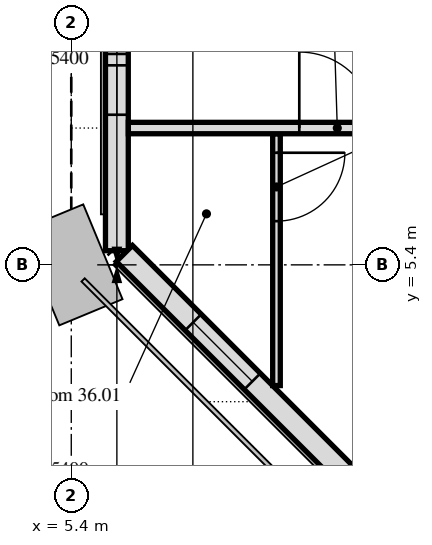
"""IFC4 building model, lengths in metres.
Left out: names, types, materials, properties, quantities, classifications, styles, units other than length and angle.
Written with IfcOpenShell. Run it as: python <this file> out.ifc"""

import sys

from ifc_helpers import new_model, si_unit, direction, frame, frame_2d, origin, place, context, subcontext, project, spatial, rectangle, extrude, element, fill, save


model = new_model("IFC4")
c1 = context("Model", 3, precision=1e-05, world=origin(), true_north=direction((0.0, 1.0)))
c2 = subcontext(c1, "Body", "Model", "MODEL_VIEW")
j1 = project(units=[si_unit("LENGTHUNIT", "METRE"), si_unit("PLANEANGLEUNIT", "RADIAN")], contexts=[c1])
p1 = place(None, origin())
s1 = spatial("IfcSite", under=j1, at=p1, CompositionType="ELEMENT")
p2 = place(p1, origin())
s2 = spatial("IfcBuilding", under=s1, at=p2, CompositionType="ELEMENT")
p3 = place(p2, frame((0.0, 0.0, 156.1)))
s3 = spatial("IfcBuildingStorey", under=s2, at=p3, CompositionType="ELEMENT", Elevation=156.1)
p4 = place(p3, frame((6.0, 16.2, 0.0), z_axis=(0.0, 0.0, 1.0), x_axis=(0.0, -1.0, 0.0)))
e1 = element("IfcWall", 1, at=p4, inside=s3, PredefinedType="SOLIDWALL", context=c2, shape_type="SweptSolid", body=[
    extrude(rectangle(XDim=10.614, YDim=0.3, at=frame_2d((5.307, 0.0))), origin(), (0.0, 0.0, 1.0), 3.0),
])
p5 = place(p4, frame((1.35, 0.0, 0.9)))
e2 = element("IfcOpeningElement", 2, at=p5, cuts=e1, PredefinedType="OPENING", context=c2, shape_type="SweptSolid", body=[
    extrude(rectangle(XDim=1.1, YDim=1.7, at=frame_2d((0.55, 0.85))), frame((0.0, 0.16, 0.0), z_axis=(0.0, -1.0, 0.0), x_axis=(1.0, 0.0, 0.0)), (0.0, 0.0, 1.0), 0.32),
])
p6 = place(p4, frame((2.95, 0.0, 0.9)))
e3 = element("IfcOpeningElement", 3, at=p6, cuts=e1, PredefinedType="OPENING", context=c2, shape_type="SweptSolid", body=[
    extrude(rectangle(XDim=1.1, YDim=1.7, at=frame_2d((0.55, 0.85))), frame((0.0, 0.16, 0.0), z_axis=(0.0, -1.0, 0.0), x_axis=(1.0, 0.0, 0.0)), (0.0, 0.0, 1.0), 0.32),
])
p7 = place(p4, frame((7.375, 0.0, 0.9)))
e4 = element("IfcOpeningElement", 4, at=p7, cuts=e1, PredefinedType="OPENING", context=c2, shape_type="SweptSolid", body=[
    extrude(rectangle(XDim=0.65, YDim=1.7, at=frame_2d((0.325, 0.85))), frame((0.0, 0.16, 0.0), z_axis=(0.0, -1.0, 0.0), x_axis=(1.0, 0.0, 0.0)), (0.0, 0.0, 1.0), 0.32),
])
p8 = place(p4, frame((8.175, 0.0, 0.9)))
e5 = element("IfcOpeningElement", 5, at=p8, cuts=e1, PredefinedType="OPENING", context=c2, shape_type="SweptSolid", body=[
    extrude(rectangle(XDim=0.65, YDim=1.7, at=frame_2d((0.325, 0.85))), frame((0.0, 0.16, 0.0), z_axis=(0.0, -1.0, 0.0), x_axis=(1.0, 0.0, 0.0)), (0.0, 0.0, 1.0), 0.32),
])
p9 = place(p3, frame((6.099, 5.55, 0.0), z_axis=(0.0, 0.0, 1.0), x_axis=(0.707106781187, -0.707106781187, 0.0)))
e6 = element("IfcWall", 6, at=p9, inside=s3, PredefinedType="SOLIDWALL", context=c2, shape_type="SweptSolid", body=[
    extrude(rectangle(XDim=6.86, YDim=0.3, at=frame_2d((3.43, 0.0))), origin(), (0.0, 0.0, 1.0), 3.0),
])
p10 = place(p9, frame((1.28, 0.0, 0.9)))
e7 = element("IfcOpeningElement", 7, at=p10, cuts=e6, PredefinedType="OPENING", context=c2, shape_type="SweptSolid", body=[
    extrude(rectangle(XDim=1.1, YDim=1.7, at=frame_2d((0.55, 0.85))), frame((0.0, 0.16, 0.0), z_axis=(0.0, -1.0, 0.0), x_axis=(1.0, 0.0, 0.0)), (0.0, 0.0, 1.0), 0.32),
])
p11 = place(p9, frame((4.48, 0.0, 0.9)))
e8 = element("IfcOpeningElement", 8, at=p11, cuts=e6, PredefinedType="OPENING", context=c2, shape_type="SweptSolid", body=[
    extrude(rectangle(XDim=1.1, YDim=1.7, at=frame_2d((0.55, 0.85))), frame((0.0, 0.16, 0.0), z_axis=(0.0, -1.0, 0.0), x_axis=(1.0, 0.0, 0.0)), (0.0, 0.0, 1.0), 0.32),
])
p12 = place(p3, frame((8.1, 7.125, 0.0), z_axis=(0.0, 0.0, 1.0), x_axis=(0.0, -1.0, 0.0)))
e9 = element("IfcWall", 9, at=p12, inside=s3, PredefinedType="PARTITIONING", context=c2, shape_type="SweptSolid", body=[
    extrude(rectangle(XDim=3.313, YDim=0.1, at=frame_2d((1.656, 0.0))), origin(), (0.0, 0.0, 1.0), 3.0),
])
p13 = place(p12, frame((0.25, 0.0, 0.0)))
e10 = element("IfcOpeningElement", 10, at=p13, cuts=e9, PredefinedType="OPENING", context=c2, shape_type="SweptSolid", body=[
    extrude(rectangle(XDim=0.9, YDim=2.1, at=frame_2d((0.45, 1.05))), frame((0.0, 0.05, 0.0), z_axis=(0.0, -1.0, 0.0), x_axis=(1.0, 0.0, 0.0)), (0.0, 0.0, 1.0), 0.1),
])
p14 = place(p3, frame((6.151, 7.2, 0.0), z_axis=(0.0, 0.0, 1.0), x_axis=(1.0, 0.0, 0.0)))
e11 = element("IfcWall", 11, at=p14, inside=s3, PredefinedType="PARTITIONING", context=c2, shape_type="SweptSolid", body=[
    extrude(rectangle(XDim=41.698, YDim=0.15, at=frame_2d((20.849, 0.0))), origin(), (0.0, 0.0, 1.0), 2.4),
])
p15 = place(p14, frame((2.249, 0.0, 0.0)))
e12 = element("IfcOpeningElement", 12, at=p15, cuts=e11, PredefinedType="OPENING", context=c2, shape_type="SweptSolid", body=[
    extrude(rectangle(XDim=1.0, YDim=2.1, at=frame_2d((0.5, 1.05))), frame((0.0, 0.075, 0.0), z_axis=(0.0, -1.0, 0.0), x_axis=(1.0, 0.0, 0.0)), (0.0, 0.0, 1.0), 0.15),
])
p16 = place(p14, frame((7.649, 0.0, 0.0)))
e13 = element("IfcOpeningElement", 13, at=p16, cuts=e11, PredefinedType="OPENING", context=c2, shape_type="SweptSolid", body=[
    extrude(rectangle(XDim=1.0, YDim=2.1, at=frame_2d((0.5, 1.05))), frame((0.0, 0.075, 0.0), z_axis=(0.0, -1.0, 0.0), x_axis=(1.0, 0.0, 0.0)), (0.0, 0.0, 1.0), 0.15),
])
p17 = place(p14, frame((13.049, 0.0, 0.0)))
e14 = element("IfcOpeningElement", 14, at=p17, cuts=e11, PredefinedType="OPENING", context=c2, shape_type="SweptSolid", body=[
    extrude(rectangle(XDim=1.0, YDim=2.1, at=frame_2d((0.5, 1.05))), frame((0.0, 0.075, 0.0), z_axis=(0.0, -1.0, 0.0), x_axis=(1.0, 0.0, 0.0)), (0.0, 0.0, 1.0), 0.15),
])
p18 = place(p14, frame((18.449, 0.0, 0.0)))
e15 = element("IfcOpeningElement", 15, at=p18, cuts=e11, PredefinedType="OPENING", context=c2, shape_type="SweptSolid", body=[
    extrude(rectangle(XDim=1.0, YDim=2.1, at=frame_2d((0.5, 1.05))), frame((0.0, 0.075, 0.0), z_axis=(0.0, -1.0, 0.0), x_axis=(1.0, 0.0, 0.0)), (0.0, 0.0, 1.0), 0.15),
])
p19 = place(p14, frame((23.849, 0.0, 0.0)))
e16 = element("IfcOpeningElement", 16, at=p19, cuts=e11, PredefinedType="OPENING", context=c2, shape_type="SweptSolid", body=[
    extrude(rectangle(XDim=1.0, YDim=2.1, at=frame_2d((0.5, 1.05))), frame((0.0, 0.075, 0.0), z_axis=(0.0, -1.0, 0.0), x_axis=(1.0, 0.0, 0.0)), (0.0, 0.0, 1.0), 0.15),
])
p20 = place(p14, frame((29.249, 0.0, 0.0)))
e17 = element("IfcOpeningElement", 17, at=p20, cuts=e11, PredefinedType="OPENING", context=c2, shape_type="SweptSolid", body=[
    extrude(rectangle(XDim=1.0, YDim=2.1, at=frame_2d((0.5, 1.05))), frame((0.0, 0.075, 0.0), z_axis=(0.0, -1.0, 0.0), x_axis=(1.0, 0.0, 0.0)), (0.0, 0.0, 1.0), 0.15),
])
p21 = place(p14, frame((37.599, 0.0, 0.0)))
e18 = element("IfcOpeningElement", 18, at=p21, cuts=e11, PredefinedType="OPENING", context=c2, shape_type="SweptSolid", body=[
    extrude(rectangle(XDim=1.0, YDim=2.1, at=frame_2d((0.5, 1.05))), frame((0.0, 0.075, 0.0), z_axis=(0.0, -1.0, 0.0), x_axis=(1.0, 0.0, 0.0)), (0.0, 0.0, 1.0), 0.15),
])
p22 = place(p7, origin())
e19 = element("IfcWindow", 19, at=p22, inside=s3, PartitioningType="SINGLE_PANEL", PredefinedType="WINDOW", context=c2, shape_type="SweptSolid", body=[
    extrude(rectangle(XDim=0.65, YDim=1.7, at=frame_2d((0.325, 0.85))), frame((0.0, 0.03, 0.0), z_axis=(0.0, -1.0, 0.0), x_axis=(1.0, 0.0, 0.0)), (0.0, 0.0, 1.0), 0.06),
])
fill(e4, e19)
p23 = place(p8, origin())
e20 = element("IfcWindow", 20, at=p23, inside=s3, PartitioningType="SINGLE_PANEL", PredefinedType="WINDOW", context=c2, shape_type="SweptSolid", body=[
    extrude(rectangle(XDim=0.65, YDim=1.7, at=frame_2d((0.325, 0.85))), frame((0.0, 0.03, 0.0), z_axis=(0.0, -1.0, 0.0), x_axis=(1.0, 0.0, 0.0)), (0.0, 0.0, 1.0), 0.06),
])
fill(e5, e20)
p24 = place(p10, origin())
e21 = element("IfcWindow", 21, at=p24, inside=s3, PartitioningType="SINGLE_PANEL", PredefinedType="WINDOW", context=c2, shape_type="SweptSolid", body=[
    extrude(rectangle(XDim=1.1, YDim=1.7, at=frame_2d((0.55, 0.85))), frame((0.0, 0.03, 0.0), z_axis=(0.0, -1.0, 0.0), x_axis=(1.0, 0.0, 0.0)), (0.0, 0.0, 1.0), 0.06),
])
fill(e7, e21)
p25 = place(p13, origin())
e22 = element("IfcDoor", 22, at=p25, inside=s3, OperationType="SINGLE_SWING_RIGHT", PredefinedType="DOOR", context=c2, shape_type="SweptSolid", body=[
    extrude(rectangle(XDim=0.9, YDim=2.1, at=frame_2d((0.45, 1.05))), frame((0.0, 0.025, 0.0), z_axis=(0.0, -1.0, 0.0), x_axis=(1.0, 0.0, 0.0)), (0.0, 0.0, 1.0), 0.05),
])
fill(e10, e22)
p26 = place(p15, origin())
e23 = element("IfcDoor", 23, at=p26, inside=s3, OperationType="SINGLE_SWING_RIGHT", PredefinedType="DOOR", context=c2, shape_type="SweptSolid", body=[
    extrude(rectangle(XDim=1.0, YDim=2.1, at=frame_2d((0.5, 1.05))), frame((0.0, 0.025, 0.0), z_axis=(0.0, -1.0, 0.0), x_axis=(1.0, 0.0, 0.0)), (0.0, 0.0, 1.0), 0.05),
])
fill(e12, e23)
save(model, sys.argv[1])
